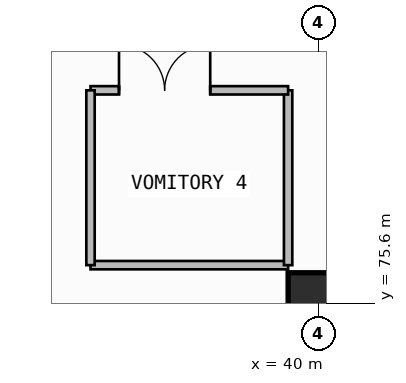
"""IFC4 building model, lengths in metres.
Left out: names, types, materials, properties, quantities, classifications, styles, units other than length and angle.
Written with IfcOpenShell. Run it as: python <this file> out.ifc"""

import sys

from ifc_helpers import new_model, si_unit, direction, frame, frame_2d, origin, origin_2d, place, context, subcontext, project, spatial, rectangle, extrude, element, fill, save


model = new_model("IFC4")
c1 = context("Model", 3, precision=1e-05, world=origin(), true_north=direction((0.0, 1.0)))
c2 = subcontext(c1, "Body", "Model", "MODEL_VIEW")
j1 = project(units=[si_unit("LENGTHUNIT", "METRE"), si_unit("PLANEANGLEUNIT", "RADIAN")], contexts=[c1])
p1 = place(None, origin())
s1 = spatial("IfcSite", under=j1, at=p1, CompositionType="ELEMENT")
p2 = place(p1, origin())
s2 = spatial("IfcBuilding", under=s1, at=p2, CompositionType="ELEMENT")
p3 = place(p2, frame((0.0, 0.0, 4.5)))
s3 = spatial("IfcBuildingStorey", under=s2, at=p3, CompositionType="ELEMENT", Elevation=4.5)
p4 = place(p3, frame((40.0, 75.6, 0.0), z_axis=(0.0, 0.0, 1.0), x_axis=(1.0, 0.0, 0.0)))
e1 = element("IfcColumn", 1, at=p4, inside=s3, PredefinedType="COLUMN", context=c2, shape_type="SweptSolid", body=[
    extrude(rectangle(XDim=1.6, YDim=1.6, at=origin_2d()), origin(), (0.0, 0.0, 1.0), 4.5),
])
p5 = place(p3, frame((34.0, 76.6, 0.0), z_axis=(0.0, 0.0, 1.0), x_axis=(1.0, 0.0, 0.0)))
e2 = element("IfcWall", 2, at=p5, inside=s3, PredefinedType="SOLIDWALL", context=c2, shape_type="SweptSolid", body=[
    extrude(rectangle(XDim=5.2, YDim=0.22, at=frame_2d((2.6, 0.0))), origin(), (0.0, 0.0, 1.0), 4.18),
])
p6 = place(p3, frame((39.2, 76.6, 0.0), z_axis=(0.0, 0.0, 1.0), x_axis=(0.0, 1.0, 0.0)))
e3 = element("IfcWall", 3, at=p6, inside=s3, PredefinedType="SOLIDWALL", context=c2, shape_type="SweptSolid", body=[
    extrude(rectangle(XDim=4.6, YDim=0.22, at=frame_2d((2.3, 0.0))), origin(), (0.0, 0.0, 1.0), 4.18),
])
p7 = place(p3, frame((39.2, 81.2, 0.0), z_axis=(0.0, 0.0, 1.0), x_axis=(-1.0, 0.0, 0.0)))
e4 = element("IfcWall", 4, at=p7, inside=s3, PredefinedType="SOLIDWALL", context=c2, shape_type="SweptSolid", body=[
    extrude(rectangle(XDim=5.2, YDim=0.22, at=frame_2d((2.6, 0.0))), origin(), (0.0, 0.0, 1.0), 4.18),
])
p8 = place(p7, frame((2.05, 0.0, 0.0)))
e5 = element("IfcOpeningElement", 5, at=p8, cuts=e4, PredefinedType="OPENING", context=c2, shape_type="SweptSolid", body=[
    extrude(rectangle(XDim=2.4, YDim=2.4, at=frame_2d((1.2, 1.2))), frame((0.0, 0.12, 0.0), z_axis=(0.0, -1.0, 0.0), x_axis=(1.0, 0.0, 0.0)), (0.0, 0.0, 1.0), 0.24),
])
p9 = place(p3, frame((34.0, 81.2, 0.0), z_axis=(0.0, 0.0, 1.0), x_axis=(0.0, -1.0, 0.0)))
e6 = element("IfcWall", 6, at=p9, inside=s3, PredefinedType="SOLIDWALL", context=c2, shape_type="SweptSolid", body=[
    extrude(rectangle(XDim=4.6, YDim=0.22, at=frame_2d((2.3, 0.0))), origin(), (0.0, 0.0, 1.0), 4.18),
])
p10 = place(p8, frame((2.4, 0.0, 0.0), z_axis=(0.0, 0.0, 1.0), x_axis=(-1.0, 0.0, 0.0)))
e7 = element("IfcDoor", 7, at=p10, inside=s3, OperationType="DOUBLE_DOOR_SINGLE_SWING", PredefinedType="USERDEFINED", context=c2, shape_type="SweptSolid", body=[
    extrude(rectangle(XDim=2.4, YDim=2.4, at=frame_2d((1.2, 1.2))), frame((0.0, 0.025, 0.0), z_axis=(0.0, -1.0, 0.0), x_axis=(1.0, 0.0, 0.0)), (0.0, 0.0, 1.0), 0.05),
])
fill(e5, e7)
save(model, sys.argv[1])
